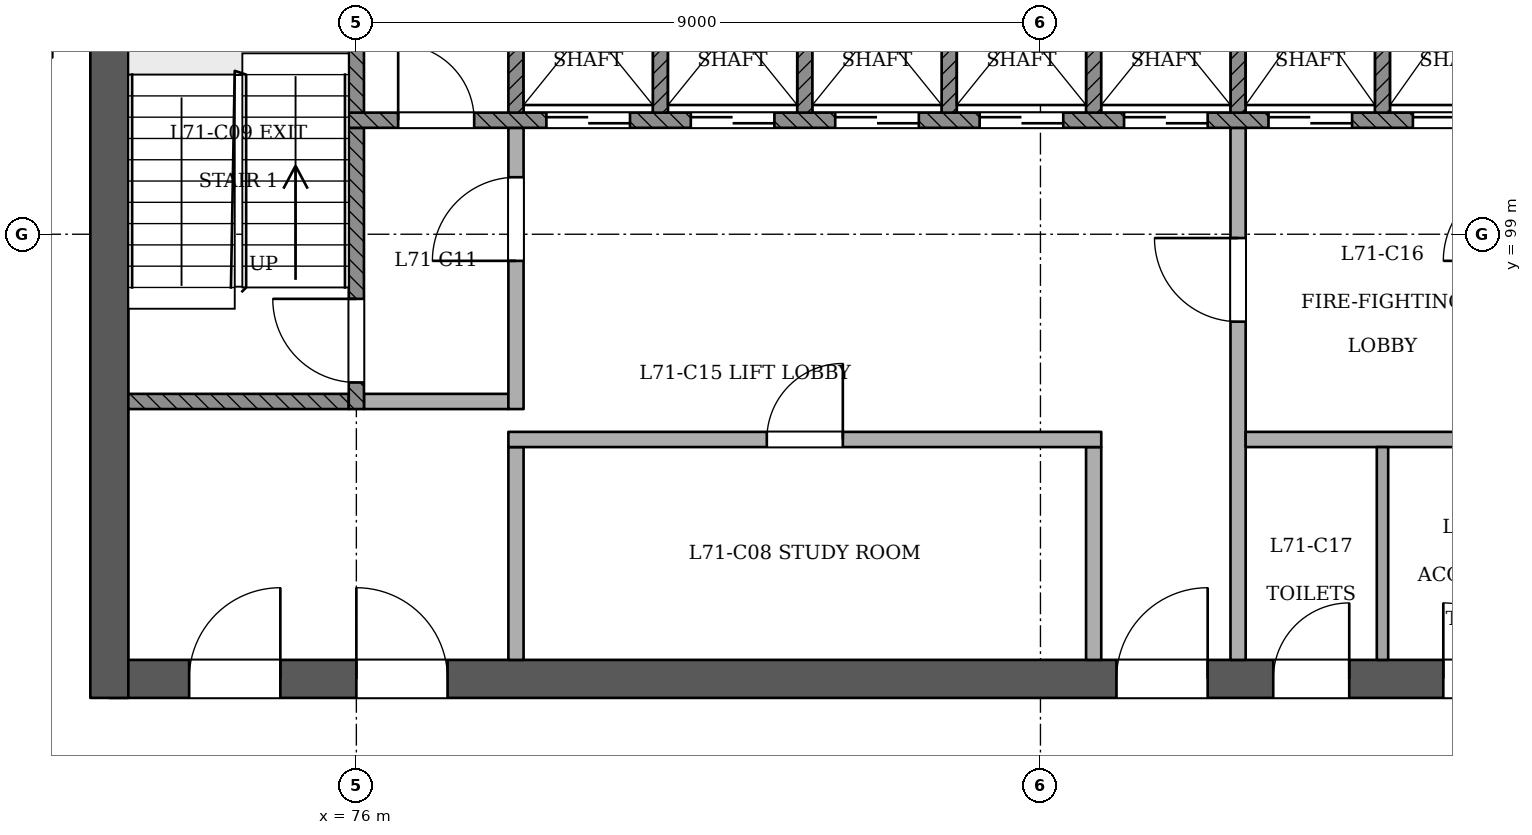
"""IFC4 building model, lengths in metres.
Left out: names, types, materials, properties, quantities, classifications, styles, units other than length and angle.
Written with IfcOpenShell. Run it as: python <this file> out.ifc"""

import sys

from ifc_helpers import new_model, si_unit, direction, frame, frame_2d, origin, place, context, subcontext, project, spatial, rectangle, extrude, element, fill, save


model = new_model("IFC4")
c1 = context("Model", 3, precision=1e-05, world=origin(), true_north=direction((0.0, 1.0)))
c2 = subcontext(c1, "Body", "Model", "MODEL_VIEW")
j1 = project(units=[si_unit("LENGTHUNIT", "METRE"), si_unit("PLANEANGLEUNIT", "RADIAN")], contexts=[c1])
p1 = place(None, origin())
s1 = spatial("IfcSite", under=j1, at=p1, CompositionType="ELEMENT")
p2 = place(p1, origin())
s2 = spatial("IfcBuilding", under=s1, at=p2, CompositionType="ELEMENT")
p3 = place(p2, frame((0.0, 0.0, 275.2)))
s3 = spatial("IfcBuildingStorey", under=s2, at=p3, CompositionType="ELEMENT", Elevation=275.2)
p4 = place(p3, frame((72.75, 93.15, 0.0), z_axis=(0.0, 0.0, 1.0), x_axis=(1.0, 0.0, 0.0)))
e1 = element("IfcWall", 1, at=p4, inside=s3, PredefinedType="SHEAR", context=c2, shape_type="SweptSolid", body=[
    extrude(rectangle(XDim=24.75, YDim=0.5, at=frame_2d((12.375, 0.0))), origin(), (0.0, 0.0, 1.0), 3.6),
])
p5 = place(p4, frame((1.05, 0.0, 0.0)))
e2 = element("IfcOpeningElement", 2, at=p5, cuts=e1, PredefinedType="OPENING", context=c2, shape_type="SweptSolid", body=[
    extrude(rectangle(XDim=1.2, YDim=2.1, at=frame_2d((0.6, 1.05))), frame((0.0, 0.26, 0.0), z_axis=(0.0, -1.0, 0.0), x_axis=(1.0, 0.0, 0.0)), (0.0, 0.0, 1.0), 0.521),
])
p6 = place(p4, frame((3.25, 0.0, 0.0)))
e3 = element("IfcOpeningElement", 3, at=p6, cuts=e1, PredefinedType="OPENING", context=c2, shape_type="SweptSolid", body=[
    extrude(rectangle(XDim=1.2, YDim=2.1, at=frame_2d((0.6, 1.05))), frame((0.0, 0.26, 0.0), z_axis=(0.0, -1.0, 0.0), x_axis=(1.0, 0.0, 0.0)), (0.0, 0.0, 1.0), 0.521),
])
p7 = place(p4, frame((13.25, 0.0, 0.0)))
e4 = element("IfcOpeningElement", 4, at=p7, cuts=e1, PredefinedType="OPENING", context=c2, shape_type="SweptSolid", body=[
    extrude(rectangle(XDim=1.2, YDim=2.1, at=frame_2d((0.6, 1.05))), frame((0.0, 0.26, 0.0), z_axis=(0.0, -1.0, 0.0), x_axis=(1.0, 0.0, 0.0)), (0.0, 0.0, 1.0), 0.521),
])
p8 = place(p4, frame((15.312, 0.0, 0.0)))
e5 = element("IfcOpeningElement", 5, at=p8, cuts=e1, PredefinedType="OPENING", context=c2, shape_type="SweptSolid", body=[
    extrude(rectangle(XDim=1.0, YDim=2.1, at=frame_2d((0.5, 1.05))), frame((0.0, 0.26, 0.0), z_axis=(0.0, -1.0, 0.0), x_axis=(1.0, 0.0, 0.0)), (0.0, 0.0, 1.0), 0.521),
])
p9 = place(p4, frame((17.55, 0.0, 0.0)))
e6 = element("IfcOpeningElement", 6, at=p9, cuts=e1, PredefinedType="OPENING", context=c2, shape_type="SweptSolid", body=[
    extrude(rectangle(XDim=1.0, YDim=2.1, at=frame_2d((0.5, 1.05))), frame((0.0, 0.26, 0.0), z_axis=(0.0, -1.0, 0.0), x_axis=(1.0, 0.0, 0.0)), (0.0, 0.0, 1.0), 0.521),
])
p10 = place(p4, frame((20.1, 0.0, 0.0)))
e7 = element("IfcOpeningElement", 7, at=p10, cuts=e1, PredefinedType="OPENING", context=c2, shape_type="SweptSolid", body=[
    extrude(rectangle(XDim=1.0, YDim=2.1, at=frame_2d((0.5, 1.05))), frame((0.0, 0.26, 0.0), z_axis=(0.0, -1.0, 0.0), x_axis=(1.0, 0.0, 0.0)), (0.0, 0.0, 1.0), 0.521),
])
p11 = place(p4, frame((22.587, 0.0, 0.0)))
e8 = element("IfcOpeningElement", 8, at=p11, cuts=e1, PredefinedType="OPENING", context=c2, shape_type="SweptSolid", body=[
    extrude(rectangle(XDim=1.0, YDim=2.1, at=frame_2d((0.5, 1.05))), frame((0.0, 0.26, 0.0), z_axis=(0.0, -1.0, 0.0), x_axis=(1.0, 0.0, 0.0)), (0.0, 0.0, 1.0), 0.521),
])
p12 = place(p3, frame((72.75, 103.65, 0.0), z_axis=(0.0, 0.0, 1.0), x_axis=(0.0, -1.0, 0.0)))
e9 = element("IfcWall", 9, at=p12, inside=s3, PredefinedType="SHEAR", context=c2, shape_type="SweptSolid", body=[
    extrude(rectangle(XDim=10.75, YDim=0.5, at=frame_2d((5.375, 0.0))), origin(), (0.0, 0.0, 1.0), 3.6),
])
p13 = place(p3, frame((72.0, 101.4, 0.0), z_axis=(0.0, 0.0, 1.0), x_axis=(-1.0, 0.0, 0.0)))
e10 = element("IfcWall", 10, at=p13, inside=s3, PredefinedType="PARTITIONING", context=c2, shape_type="SweptSolid", body=[
    extrude(rectangle(XDim=1.8, YDim=0.15, at=frame_2d((0.9, 0.0))), origin(), (0.0, 0.0, 1.0), 3.2),
])
for number, where, z_axis, x_axis in (
    (11, (78.1, 93.4, 0.0), (0.0, 0.0, 1.0), (0.0, 1.0, 0.0)),
    (12, (85.7, 93.4, 0.0), (0.0, 0.0, 1.0), (0.0, 1.0, 0.0)),
):
    element("IfcWall", number, at=place(p3, frame(where, z_axis=z_axis, x_axis=x_axis)), inside=s3, PredefinedType="PARTITIONING", context=c2, shape_type="SweptSolid", body=[
        extrude(rectangle(XDim=2.8, YDim=0.2, at=frame_2d((1.4, 0.0))), origin(), (0.0, 0.0, 1.0), 3.2),
    ])
p14 = place(p3, frame((87.6, 93.4, 0.0), z_axis=(0.0, 0.0, 1.0), x_axis=(0.0, 1.0, 0.0)))
e13 = element("IfcWall", 13, at=p14, inside=s3, PredefinedType="PARTITIONING", context=c2, shape_type="SweptSolid", body=[
    extrude(rectangle(XDim=7.0, YDim=0.2, at=frame_2d((3.5, 0.0))), origin(), (0.0, 0.0, 1.0), 3.2),
])
p15 = place(p14, frame((4.45, 0.0, 0.0)))
e14 = element("IfcOpeningElement", 14, at=p15, cuts=e13, PredefinedType="OPENING", context=c2, shape_type="SweptSolid", body=[
    extrude(rectangle(XDim=1.1, YDim=2.1, at=frame_2d((0.55, 1.05))), frame((0.0, 0.11, 0.0), z_axis=(0.0, -1.0, 0.0), x_axis=(1.0, 0.0, 0.0)), (0.0, 0.0, 1.0), 0.221),
])
p16 = place(p3, frame((89.5, 93.4, 0.0), z_axis=(0.0, 0.0, 1.0), x_axis=(0.0, 1.0, 0.0)))
e15 = element("IfcWall", 15, at=p16, inside=s3, PredefinedType="PARTITIONING", context=c2, shape_type="SweptSolid", body=[
    extrude(rectangle(XDim=2.8, YDim=0.15, at=frame_2d((1.4, 0.0))), origin(), (0.0, 0.0, 1.0), 3.2),
])
p17 = place(p3, frame((78.0, 96.3, 0.0), z_axis=(0.0, 0.0, 1.0), x_axis=(1.0, 0.0, 0.0)))
e16 = element("IfcWall", 16, at=p17, inside=s3, PredefinedType="PARTITIONING", context=c2, shape_type="SweptSolid", body=[
    extrude(rectangle(XDim=7.8, YDim=0.2, at=frame_2d((3.9, 0.0))), origin(), (0.0, 0.0, 1.0), 3.2),
])
p18 = place(p17, frame((3.4, 0.0, 0.0)))
e17 = element("IfcOpeningElement", 17, at=p18, cuts=e16, PredefinedType="OPENING", context=c2, shape_type="SweptSolid", body=[
    extrude(rectangle(XDim=1.0, YDim=2.1, at=frame_2d((0.5, 1.05))), frame((0.0, 0.11, 0.0), z_axis=(0.0, -1.0, 0.0), x_axis=(1.0, 0.0, 0.0)), (0.0, 0.0, 1.0), 0.221),
])
p19 = place(p3, frame((87.7, 96.3, 0.0), z_axis=(0.0, 0.0, 1.0), x_axis=(1.0, 0.0, 0.0)))
e18 = element("IfcWall", 18, at=p19, inside=s3, PredefinedType="PARTITIONING", context=c2, shape_type="SweptSolid", body=[
    extrude(rectangle(XDim=3.6, YDim=0.2, at=frame_2d((1.8, 0.0))), origin(), (0.0, 0.0, 1.0), 3.2),
])
p20 = place(p3, frame((73.0, 96.8, 0.0), z_axis=(0.0, 0.0, 1.0), x_axis=(1.0, 0.0, 0.0)))
e19 = element("IfcWall", 19, at=p20, inside=s3, PredefinedType="SOLIDWALL", context=c2, shape_type="SweptSolid", body=[
    extrude(rectangle(XDim=2.9, YDim=0.2, at=frame_2d((1.45, 0.0))), origin(), (0.0, 0.0, 1.0), 3.2),
])
p21 = place(p3, frame((76.0, 96.7, 0.0), z_axis=(0.0, 0.0, 1.0), x_axis=(0.0, 1.0, 0.0)))
e20 = element("IfcWall", 20, at=p21, inside=s3, PredefinedType="SOLIDWALL", context=c2, shape_type="SweptSolid", body=[
    extrude(rectangle(XDim=3.7, YDim=0.2, at=frame_2d((1.85, 0.0))), origin(), (0.0, 0.0, 1.0), 3.2),
])
p22 = place(p21, frame((0.35, 0.0, 0.0)))
e21 = element("IfcOpeningElement", 21, at=p22, cuts=e20, PredefinedType="OPENING", context=c2, shape_type="SweptSolid", body=[
    extrude(rectangle(XDim=1.1, YDim=2.1, at=frame_2d((0.55, 1.05))), frame((0.0, 0.11, 0.0), z_axis=(0.0, -1.0, 0.0), x_axis=(1.0, 0.0, 0.0)), (0.0, 0.0, 1.0), 0.221),
])
p23 = place(p3, frame((76.1, 96.8, 0.0), z_axis=(0.0, 0.0, 1.0), x_axis=(1.0, 0.0, 0.0)))
e22 = element("IfcWall", 22, at=p23, inside=s3, PredefinedType="PARTITIONING", context=c2, shape_type="SweptSolid", body=[
    extrude(rectangle(XDim=1.9, YDim=0.2, at=frame_2d((0.95, 0.0))), origin(), (0.0, 0.0, 1.0), 3.2),
])
p24 = place(p3, frame((78.1, 96.7, 0.0), z_axis=(0.0, 0.0, 1.0), x_axis=(0.0, 1.0, 0.0)))
e23 = element("IfcWall", 23, at=p24, inside=s3, PredefinedType="PARTITIONING", context=c2, shape_type="SweptSolid", body=[
    extrude(rectangle(XDim=3.7, YDim=0.2, at=frame_2d((1.85, 0.0))), origin(), (0.0, 0.0, 1.0), 3.2),
])
p25 = place(p24, frame((1.95, 0.0, 0.0)))
e24 = element("IfcOpeningElement", 24, at=p25, cuts=e23, PredefinedType="OPENING", context=c2, shape_type="SweptSolid", body=[
    extrude(rectangle(XDim=1.1, YDim=2.1, at=frame_2d((0.55, 1.05))), frame((0.0, 0.11, 0.0), z_axis=(0.0, -1.0, 0.0), x_axis=(1.0, 0.0, 0.0)), (0.0, 0.0, 1.0), 0.221),
])
p26 = place(p3, frame((75.9, 100.5, 0.0), z_axis=(0.0, 0.0, 1.0), x_axis=(1.0, 0.0, 0.0)))
e25 = element("IfcWall", 25, at=p26, inside=s3, PredefinedType="SOLIDWALL", context=c2, shape_type="SweptSolid", body=[
    extrude(rectangle(XDim=18.2, YDim=0.2, at=frame_2d((9.1, 0.0))), origin(), (0.0, 0.0, 1.0), 3.2),
])
p27 = place(p26, frame((2.6, 0.0, 0.0)))
e26 = element("IfcOpeningElement", 26, at=p27, cuts=e25, PredefinedType="OPENING", context=c2, shape_type="SweptSolid", body=[
    extrude(rectangle(XDim=1.1, YDim=2.1, at=frame_2d((0.55, 1.05))), frame((0.0, 0.11, 0.0), z_axis=(0.0, -1.0, 0.0), x_axis=(1.0, 0.0, 0.0)), (0.0, 0.0, 1.0), 0.221),
])
p28 = place(p26, frame((4.5, 0.0, 0.0)))
e27 = element("IfcOpeningElement", 27, at=p28, cuts=e25, PredefinedType="OPENING", context=c2, shape_type="SweptSolid", body=[
    extrude(rectangle(XDim=1.1, YDim=2.1, at=frame_2d((0.55, 1.05))), frame((0.0, 0.11, 0.0), z_axis=(0.0, -1.0, 0.0), x_axis=(1.0, 0.0, 0.0)), (0.0, 0.0, 1.0), 0.221),
])
p29 = place(p26, frame((6.4, 0.0, 0.0)))
e28 = element("IfcOpeningElement", 28, at=p29, cuts=e25, PredefinedType="OPENING", context=c2, shape_type="SweptSolid", body=[
    extrude(rectangle(XDim=1.1, YDim=2.1, at=frame_2d((0.55, 1.05))), frame((0.0, 0.11, 0.0), z_axis=(0.0, -1.0, 0.0), x_axis=(1.0, 0.0, 0.0)), (0.0, 0.0, 1.0), 0.221),
])
p30 = place(p26, frame((8.3, 0.0, 0.0)))
e29 = element("IfcOpeningElement", 29, at=p30, cuts=e25, PredefinedType="OPENING", context=c2, shape_type="SweptSolid", body=[
    extrude(rectangle(XDim=1.1, YDim=2.1, at=frame_2d((0.55, 1.05))), frame((0.0, 0.11, 0.0), z_axis=(0.0, -1.0, 0.0), x_axis=(1.0, 0.0, 0.0)), (0.0, 0.0, 1.0), 0.221),
])
p31 = place(p26, frame((10.2, 0.0, 0.0)))
e30 = element("IfcOpeningElement", 30, at=p31, cuts=e25, PredefinedType="OPENING", context=c2, shape_type="SweptSolid", body=[
    extrude(rectangle(XDim=1.1, YDim=2.1, at=frame_2d((0.55, 1.05))), frame((0.0, 0.11, 0.0), z_axis=(0.0, -1.0, 0.0), x_axis=(1.0, 0.0, 0.0)), (0.0, 0.0, 1.0), 0.221),
])
p32 = place(p26, frame((12.1, 0.0, 0.0)))
e31 = element("IfcOpeningElement", 31, at=p32, cuts=e25, PredefinedType="OPENING", context=c2, shape_type="SweptSolid", body=[
    extrude(rectangle(XDim=1.1, YDim=2.1, at=frame_2d((0.55, 1.05))), frame((0.0, 0.11, 0.0), z_axis=(0.0, -1.0, 0.0), x_axis=(1.0, 0.0, 0.0)), (0.0, 0.0, 1.0), 0.221),
])
p33 = place(p26, frame((14.0, 0.0, 0.0)))
e32 = element("IfcOpeningElement", 32, at=p33, cuts=e25, PredefinedType="OPENING", context=c2, shape_type="SweptSolid", body=[
    extrude(rectangle(XDim=1.1, YDim=2.1, at=frame_2d((0.55, 1.05))), frame((0.0, 0.11, 0.0), z_axis=(0.0, -1.0, 0.0), x_axis=(1.0, 0.0, 0.0)), (0.0, 0.0, 1.0), 0.221),
])
p34 = place(p26, frame((0.65, 0.0, 0.0)))
e33 = element("IfcOpeningElement", 33, at=p34, cuts=e25, PredefinedType="OPENING", context=c2, shape_type="SweptSolid", body=[
    extrude(rectangle(XDim=1.0, YDim=2.1, at=frame_2d((0.5, 1.05))), frame((0.0, 0.11, 0.0), z_axis=(0.0, -1.0, 0.0), x_axis=(1.0, 0.0, 0.0)), (0.0, 0.0, 1.0), 0.221),
])
p35 = place(p26, frame((16.3, 0.0, 0.0)))
e34 = element("IfcOpeningElement", 34, at=p35, cuts=e25, PredefinedType="OPENING", context=c2, shape_type="SweptSolid", body=[
    extrude(rectangle(XDim=1.0, YDim=2.1, at=frame_2d((0.5, 1.05))), frame((0.0, 0.11, 0.0), z_axis=(0.0, -1.0, 0.0), x_axis=(1.0, 0.0, 0.0)), (0.0, 0.0, 1.0), 0.221),
])
for number, where, z_axis, x_axis in (
    (35, (76.0, 100.6, 0.0), (0.0, 0.0, 1.0), (0.0, 1.0, 0.0)),
    (36, (78.1, 100.6, 0.0), (0.0, 0.0, 1.0), (0.0, 1.0, 0.0)),
    (37, (80.0, 100.6, 0.0), (0.0, 0.0, 1.0), (0.0, 1.0, 0.0)),
    (38, (81.9, 100.6, 0.0), (0.0, 0.0, 1.0), (0.0, 1.0, 0.0)),
    (39, (83.8, 100.6, 0.0), (0.0, 0.0, 1.0), (0.0, 1.0, 0.0)),
    (40, (85.7, 100.6, 0.0), (0.0, 0.0, 1.0), (0.0, 1.0, 0.0)),
    (41, (87.6, 100.6, 0.0), (0.0, 0.0, 1.0), (0.0, 1.0, 0.0)),
    (42, (89.5, 100.6, 0.0), (0.0, 0.0, 1.0), (0.0, 1.0, 0.0)),
):
    element("IfcWall", number, at=place(p3, frame(where, z_axis=z_axis, x_axis=x_axis)), inside=s3, PredefinedType="SOLIDWALL", context=c2, shape_type="SweptSolid", body=[
        extrude(rectangle(XDim=2.8, YDim=0.2, at=frame_2d((1.4, 0.0))), origin(), (0.0, 0.0, 1.0), 3.2),
    ])
p36 = place(p27, origin())
e43 = element("IfcDoor", 43, at=p36, inside=s3, OperationType="SLIDING_TO_RIGHT", PredefinedType="NOTDEFINED", context=c2, shape_type="SweptSolid", body=[
    extrude(rectangle(XDim=1.1, YDim=2.1, at=frame_2d((0.55, 1.05))), frame((0.0, 0.025, 0.0), z_axis=(0.0, -1.0, 0.0), x_axis=(1.0, 0.0, 0.0)), (0.0, 0.0, 1.0), 0.05),
])
fill(e26, e43)
p37 = place(p28, origin())
e44 = element("IfcDoor", 44, at=p37, inside=s3, OperationType="SLIDING_TO_LEFT", PredefinedType="NOTDEFINED", context=c2, shape_type="SweptSolid", body=[
    extrude(rectangle(XDim=1.1, YDim=2.1, at=frame_2d((0.55, 1.05))), frame((0.0, 0.025, 0.0), z_axis=(0.0, -1.0, 0.0), x_axis=(1.0, 0.0, 0.0)), (0.0, 0.0, 1.0), 0.05),
])
fill(e27, e44)
p38 = place(p29, origin())
e45 = element("IfcDoor", 45, at=p38, inside=s3, OperationType="SLIDING_TO_RIGHT", PredefinedType="NOTDEFINED", context=c2, shape_type="SweptSolid", body=[
    extrude(rectangle(XDim=1.1, YDim=2.1, at=frame_2d((0.55, 1.05))), frame((0.0, 0.025, 0.0), z_axis=(0.0, -1.0, 0.0), x_axis=(1.0, 0.0, 0.0)), (0.0, 0.0, 1.0), 0.05),
])
fill(e28, e45)
p39 = place(p30, origin())
e46 = element("IfcDoor", 46, at=p39, inside=s3, OperationType="SLIDING_TO_LEFT", PredefinedType="NOTDEFINED", context=c2, shape_type="SweptSolid", body=[
    extrude(rectangle(XDim=1.1, YDim=2.1, at=frame_2d((0.55, 1.05))), frame((0.0, 0.025, 0.0), z_axis=(0.0, -1.0, 0.0), x_axis=(1.0, 0.0, 0.0)), (0.0, 0.0, 1.0), 0.05),
])
fill(e29, e46)
p40 = place(p31, origin())
e47 = element("IfcDoor", 47, at=p40, inside=s3, OperationType="SLIDING_TO_RIGHT", PredefinedType="NOTDEFINED", context=c2, shape_type="SweptSolid", body=[
    extrude(rectangle(XDim=1.1, YDim=2.1, at=frame_2d((0.55, 1.05))), frame((0.0, 0.025, 0.0), z_axis=(0.0, -1.0, 0.0), x_axis=(1.0, 0.0, 0.0)), (0.0, 0.0, 1.0), 0.05),
])
fill(e30, e47)
p41 = place(p32, origin())
e48 = element("IfcDoor", 48, at=p41, inside=s3, OperationType="SLIDING_TO_RIGHT", PredefinedType="NOTDEFINED", context=c2, shape_type="SweptSolid", body=[
    extrude(rectangle(XDim=1.1, YDim=2.1, at=frame_2d((0.55, 1.05))), frame((0.0, 0.025, 0.0), z_axis=(0.0, -1.0, 0.0), x_axis=(1.0, 0.0, 0.0)), (0.0, 0.0, 1.0), 0.05),
])
fill(e31, e48)
p42 = place(p33, origin())
e49 = element("IfcDoor", 49, at=p42, inside=s3, OperationType="SLIDING_TO_LEFT", PredefinedType="NOTDEFINED", context=c2, shape_type="SweptSolid", body=[
    extrude(rectangle(XDim=1.1, YDim=2.1, at=frame_2d((0.55, 1.05))), frame((0.0, 0.025, 0.0), z_axis=(0.0, -1.0, 0.0), x_axis=(1.0, 0.0, 0.0)), (0.0, 0.0, 1.0), 0.05),
])
fill(e32, e49)
p43 = place(p22, origin())
e50 = element("IfcDoor", 50, at=p43, inside=s3, OperationType="SINGLE_SWING_RIGHT", PredefinedType="NOTDEFINED", context=c2, shape_type="SweptSolid", body=[
    extrude(rectangle(XDim=1.1, YDim=2.1, at=frame_2d((0.55, 1.05))), frame((0.0, 0.025, 0.0), z_axis=(0.0, -1.0, 0.0), x_axis=(1.0, 0.0, 0.0)), (0.0, 0.0, 1.0), 0.05),
])
fill(e21, e50)
p44 = place(p25, origin())
e51 = element("IfcDoor", 51, at=p44, inside=s3, OperationType="SINGLE_SWING_LEFT", PredefinedType="NOTDEFINED", context=c2, shape_type="SweptSolid", body=[
    extrude(rectangle(XDim=1.1, YDim=2.1, at=frame_2d((0.55, 1.05))), frame((0.0, 0.025, 0.0), z_axis=(0.0, -1.0, 0.0), x_axis=(1.0, 0.0, 0.0)), (0.0, 0.0, 1.0), 0.05),
])
fill(e24, e51)
p45 = place(p15, origin())
e52 = element("IfcDoor", 52, at=p45, inside=s3, OperationType="SINGLE_SWING_RIGHT", PredefinedType="NOTDEFINED", context=c2, shape_type="SweptSolid", body=[
    extrude(rectangle(XDim=1.1, YDim=2.1, at=frame_2d((0.55, 1.05))), frame((0.0, 0.025, 0.0), z_axis=(0.0, -1.0, 0.0), x_axis=(1.0, 0.0, 0.0)), (0.0, 0.0, 1.0), 0.05),
])
fill(e14, e52)
p46 = place(p5, origin())
e53 = element("IfcDoor", 53, at=p46, inside=s3, OperationType="SINGLE_SWING_RIGHT", PredefinedType="NOTDEFINED", context=c2, shape_type="SweptSolid", body=[
    extrude(rectangle(XDim=1.2, YDim=2.1, at=frame_2d((0.6, 1.05))), frame((0.0, 0.025, 0.0), z_axis=(0.0, -1.0, 0.0), x_axis=(1.0, 0.0, 0.0)), (0.0, 0.0, 1.0), 0.05),
])
fill(e2, e53)
p47 = place(p6, origin())
e54 = element("IfcDoor", 54, at=p47, inside=s3, OperationType="SINGLE_SWING_LEFT", PredefinedType="NOTDEFINED", context=c2, shape_type="SweptSolid", body=[
    extrude(rectangle(XDim=1.2, YDim=2.1, at=frame_2d((0.6, 1.05))), frame((0.0, 0.025, 0.0), z_axis=(0.0, -1.0, 0.0), x_axis=(1.0, 0.0, 0.0)), (0.0, 0.0, 1.0), 0.05),
])
fill(e3, e54)
p48 = place(p7, origin())
e55 = element("IfcDoor", 55, at=p48, inside=s3, OperationType="SINGLE_SWING_RIGHT", PredefinedType="NOTDEFINED", context=c2, shape_type="SweptSolid", body=[
    extrude(rectangle(XDim=1.2, YDim=2.1, at=frame_2d((0.6, 1.05))), frame((0.0, 0.025, 0.0), z_axis=(0.0, -1.0, 0.0), x_axis=(1.0, 0.0, 0.0)), (0.0, 0.0, 1.0), 0.05),
])
fill(e4, e55)
p49 = place(p34, origin())
e56 = element("IfcDoor", 56, at=p49, inside=s3, OperationType="SINGLE_SWING_LEFT", PredefinedType="NOTDEFINED", context=c2, shape_type="SweptSolid", body=[
    extrude(rectangle(XDim=1.0, YDim=2.1, at=frame_2d((0.5, 1.05))), frame((0.0, 0.025, 0.0), z_axis=(0.0, -1.0, 0.0), x_axis=(1.0, 0.0, 0.0)), (0.0, 0.0, 1.0), 0.05),
])
fill(e33, e56)
p50 = place(p8, origin())
e57 = element("IfcDoor", 57, at=p50, inside=s3, OperationType="SINGLE_SWING_RIGHT", PredefinedType="NOTDEFINED", context=c2, shape_type="SweptSolid", body=[
    extrude(rectangle(XDim=1.0, YDim=2.1, at=frame_2d((0.5, 1.05))), frame((0.0, 0.025, 0.0), z_axis=(0.0, -1.0, 0.0), x_axis=(1.0, 0.0, 0.0)), (0.0, 0.0, 1.0), 0.05),
])
fill(e5, e57)
p51 = place(p9, origin())
e58 = element("IfcDoor", 58, at=p51, inside=s3, OperationType="SINGLE_SWING_LEFT", PredefinedType="NOTDEFINED", context=c2, shape_type="SweptSolid", body=[
    extrude(rectangle(XDim=1.0, YDim=2.1, at=frame_2d((0.5, 1.05))), frame((0.0, 0.025, 0.0), z_axis=(0.0, -1.0, 0.0), x_axis=(1.0, 0.0, 0.0)), (0.0, 0.0, 1.0), 0.05),
])
fill(e6, e58)
p52 = place(p18, origin())
e59 = element("IfcDoor", 59, at=p52, inside=s3, OperationType="SINGLE_SWING_RIGHT", PredefinedType="NOTDEFINED", context=c2, shape_type="SweptSolid", body=[
    extrude(rectangle(XDim=1.0, YDim=2.1, at=frame_2d((0.5, 1.05))), frame((0.0, 0.025, 0.0), z_axis=(0.0, -1.0, 0.0), x_axis=(1.0, 0.0, 0.0)), (0.0, 0.0, 1.0), 0.05),
])
fill(e17, e59)
save(model, sys.argv[1])
